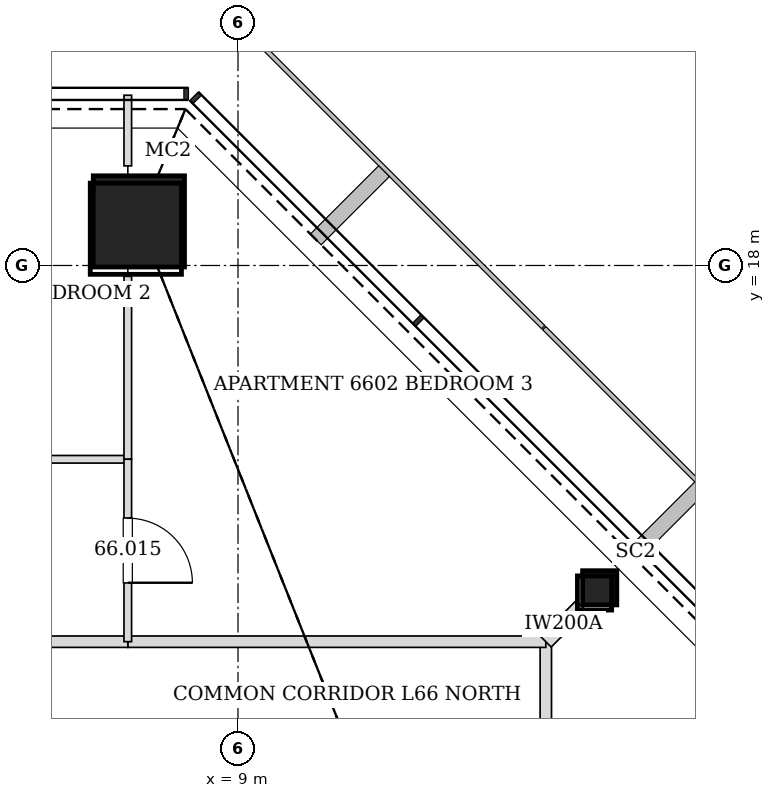
"""IFC4 building model, lengths in metres.
Left out: names, types, materials, properties, quantities, classifications, styles, units other than length and angle.
Written with IfcOpenShell. Run it as: python <this file> out.ifc"""

import sys

from ifc_helpers import new_model, si_unit, direction, frame, frame_2d, origin, origin_2d, place, context, subcontext, project, spatial, rectangle, hollow_rectangle, extrude, element, fill, save


model = new_model("IFC4")
c1 = context("Model", 3, precision=1e-05, world=origin(), true_north=direction((0.0, 1.0)))
c2 = subcontext(c1, "Body", "Model", "MODEL_VIEW")
j1 = project(units=[si_unit("LENGTHUNIT", "METRE"), si_unit("PLANEANGLEUNIT", "RADIAN")], contexts=[c1])
p1 = place(None, origin())
s1 = spatial("IfcSite", under=j1, at=p1, CompositionType="ELEMENT")
p2 = place(p1, origin())
s2 = spatial("IfcBuilding", under=s1, at=p2, CompositionType="ELEMENT")
p3 = place(p2, frame((0.0, 0.0, 274.2)))
s3 = spatial("IfcBuildingStorey", under=s2, at=p3, CompositionType="ELEMENT", Elevation=274.2)
p4 = place(p3, frame((7.696, 18.58, 0.0), z_axis=(-0.011698403216, -0.028277121884, 0.999531666202), x_axis=(0.924045401938, -0.382282742426, 0.0)))
e1 = element("IfcColumn", 1, at=p4, inside=s3, PredefinedType="COLUMN", context=c2, shape_type="SweptSolid", body=[
    extrude(hollow_rectangle(XDim=1.2, YDim=1.2, WallThickness=0.055, at=origin_2d()), origin(), (0.0, 0.0, 1.0), 3.402),
])
p5 = place(p3, frame((13.759, 13.759, 0.0), z_axis=(-0.019953277583, -0.019953277583, 0.999601787427), x_axis=(0.707106781187, -0.707106781187, 0.0)))
e2 = element("IfcColumn", 2, at=p5, inside=s3, PredefinedType="COLUMN", context=c2, shape_type="SweptSolid", body=[
    extrude(hollow_rectangle(XDim=0.45, YDim=0.45, WallThickness=0.02, at=origin_2d()), origin(), (0.0, 0.0, 1.0), 3.402),
])
for number, where, z_axis, x_axis in (
    (3, (13.05, 7.549, 0.0), (0.0, 0.0, 1.0), (0.0, 1.0, 0.0)),
    (4, (13.05, 13.05, 0.0), (0.0, 0.0, 1.0), (-1.0, 0.0, 0.0)),
):
    element("IfcWall", number, at=place(p3, frame(where, z_axis=z_axis, x_axis=x_axis)), inside=s3, PredefinedType="PARTITIONING", context=c2, shape_type="SweptSolid", body=[
        extrude(rectangle(XDim=5.501, YDim=0.15, at=frame_2d((2.75, 0.0))), origin(), (0.0, 0.0, 1.0), 2.428),
    ])
p6 = place(p3, frame((7.551, 13.05, 0.0), z_axis=(0.0, 0.0, 1.0), x_axis=(-1.0, 0.0, 0.0)))
e5 = element("IfcWall", 5, at=p6, inside=s3, PredefinedType="PARTITIONING", context=c2, shape_type="SweptSolid", body=[
    extrude(rectangle(XDim=8.751, YDim=0.15, at=frame_2d((4.375, 0.0))), origin(), (0.0, 0.0, 1.0), 2.344),
])
p7 = place(p3, frame((13.518, 13.518, 0.0), z_axis=(0.0, 0.0, 1.0), x_axis=(-0.707106781187, -0.707106781187, 0.0)))
e6 = element("IfcWall", 6, at=p7, inside=s3, PredefinedType="PARTITIONING", context=c2, shape_type="SweptSolid", body=[
    extrude(rectangle(XDim=0.662, YDim=0.2, at=frame_2d((0.331, 0.0))), origin(), (0.0, 0.0, 1.0), 2.591),
])
p8 = place(p3, frame((1.95, 15.45, 0.0), z_axis=(0.0, 0.0, 1.0), x_axis=(1.0, 0.0, 0.0)))
e7 = element("IfcWall", 7, at=p8, inside=s3, PredefinedType="PARTITIONING", context=c2, shape_type="SweptSolid", body=[
    extrude(rectangle(XDim=5.6, YDim=0.1, at=frame_2d((2.8, 0.0))), origin(), (0.0, 0.0, 1.0), 3.2),
])
p9 = place(p8, frame((0.575, 0.0, 0.0)))
e8 = element("IfcOpeningElement", 8, at=p9, cuts=e7, PredefinedType="OPENING", context=c2, shape_type="SweptSolid", body=[
    extrude(rectangle(XDim=0.85, YDim=2.1, at=frame_2d((0.425, 1.05))), frame((0.0, 0.06, 0.0), z_axis=(0.0, -1.0, 0.0), x_axis=(1.0, 0.0, 0.0)), (0.0, 0.0, 1.0), 0.12),
])
p10 = place(p8, frame((3.375, 0.0, 0.0)))
e9 = element("IfcOpeningElement", 9, at=p10, cuts=e7, PredefinedType="OPENING", context=c2, shape_type="SweptSolid", body=[
    extrude(rectangle(XDim=0.85, YDim=2.1, at=frame_2d((0.425, 1.05))), frame((0.0, 0.06, 0.0), z_axis=(0.0, -1.0, 0.0), x_axis=(1.0, 0.0, 0.0)), (0.0, 0.0, 1.0), 0.12),
])
p11 = place(p3, frame((7.55, 15.45, 0.0), z_axis=(0.0, 0.0, 1.0), x_axis=(0.0, 1.0, 0.0)))
e10 = element("IfcWall", 10, at=p11, inside=s3, PredefinedType="PARTITIONING", context=c2, shape_type="SweptSolid", body=[
    extrude(rectangle(XDim=2.407, YDim=0.1, at=frame_2d((1.204, 0.0))), origin(), (0.0, 0.0, 1.0), 2.591),
])
p12 = place(p3, frame((7.55, 19.311, 0.0), z_axis=(0.0, 0.0, 1.0), x_axis=(0.0, 1.0, 0.0)))
e11 = element("IfcWall", 11, at=p12, inside=s3, PredefinedType="PARTITIONING", context=c2, shape_type="SweptSolid", body=[
    extrude(rectangle(XDim=0.929, YDim=0.1, at=frame_2d((0.465, 0.0))), origin(), (0.0, 0.0, 1.0), 3.2),
])
p13 = place(p3, frame((7.55, 15.451, 0.0), z_axis=(0.0, 0.0, 1.0), x_axis=(0.0, -1.0, 0.0)))
e12 = element("IfcWall", 12, at=p13, inside=s3, PredefinedType="PARTITIONING", context=c2, shape_type="SweptSolid", body=[
    extrude(rectangle(XDim=2.401, YDim=0.1, at=frame_2d((1.2, 0.0))), origin(), (0.0, 0.0, 1.0), 2.591),
])
p14 = place(p13, frame((0.775, 0.0, 0.0)))
e13 = element("IfcOpeningElement", 13, at=p14, cuts=e12, PredefinedType="OPENING", context=c2, shape_type="SweptSolid", body=[
    extrude(rectangle(XDim=0.85, YDim=2.1, at=frame_2d((0.425, 1.05))), frame((0.0, 0.06, 0.0), z_axis=(0.0, -1.0, 0.0), x_axis=(1.0, 0.0, 0.0)), (0.0, 0.0, 1.0), 0.12),
])
p15 = place(p14, origin())
e14 = element("IfcDoor", 14, at=p15, inside=s3, OperationType="SINGLE_SWING_RIGHT", PredefinedType="DOOR", context=c2, shape_type="SweptSolid", body=[
    extrude(rectangle(XDim=0.85, YDim=2.1, at=frame_2d((0.425, 1.05))), frame((0.0, 0.025, 0.0), z_axis=(0.0, -1.0, 0.0), x_axis=(1.0, 0.0, 0.0)), (0.0, 0.0, 1.0), 0.05),
])
fill(e13, e14)
save(model, sys.argv[1])
